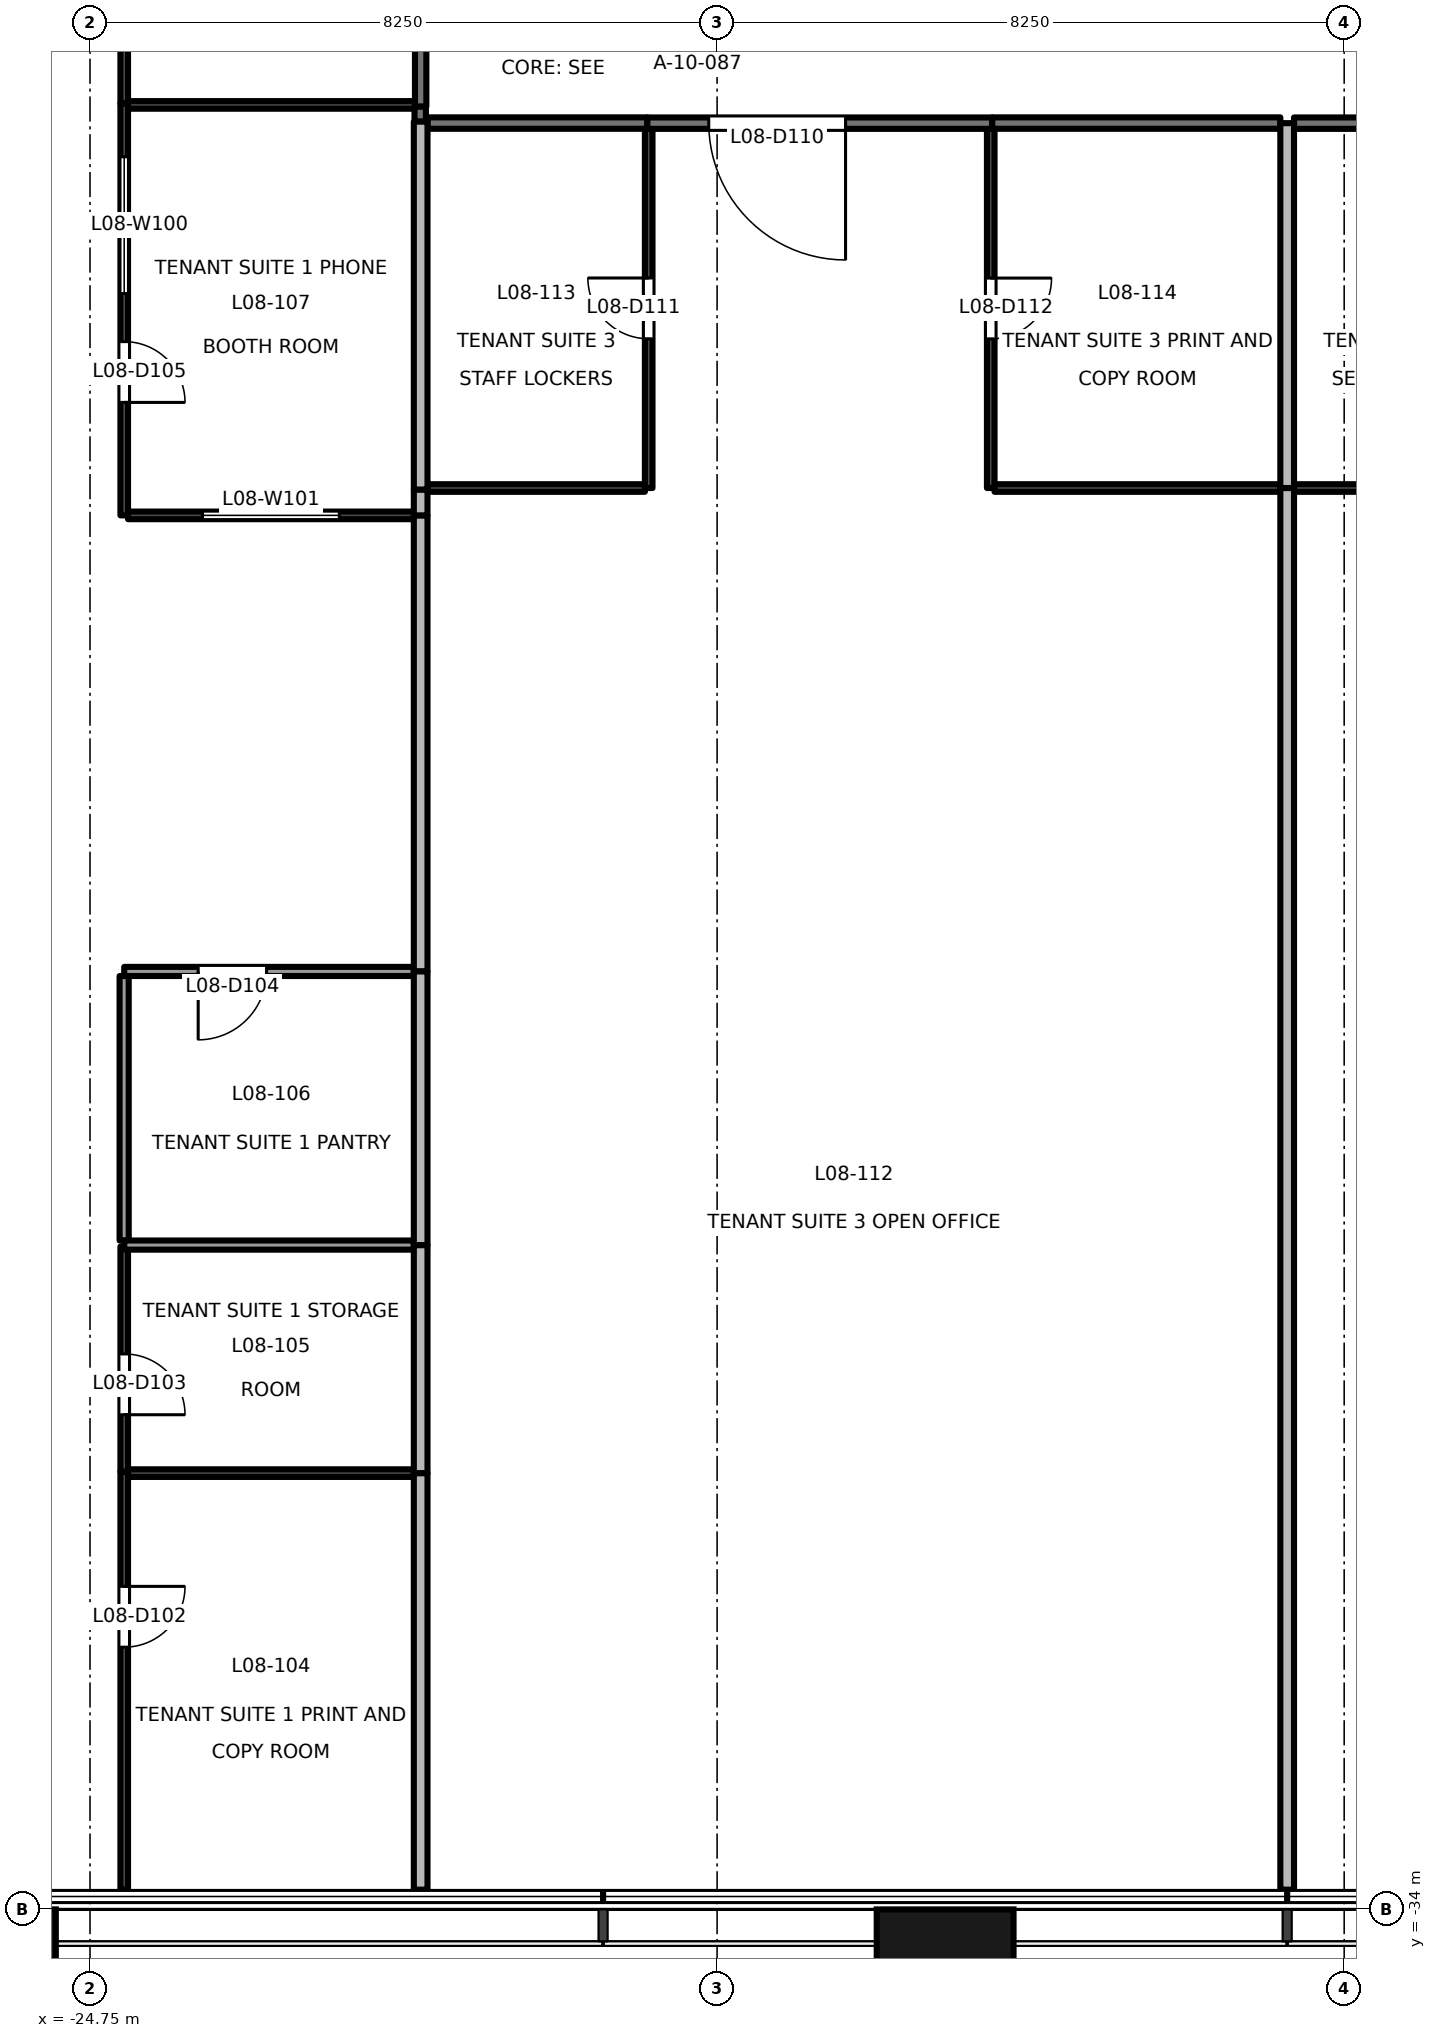
"""IFC4 building model, lengths in metres.
Left out: names, types, materials, properties, quantities, classifications, styles, units other than length and angle.
Written with IfcOpenShell. Run it as: python <this file> out.ifc"""

import sys

from ifc_helpers import new_model, si_unit, direction, frame, frame_2d, origin, origin_2d, place, context, subcontext, project, spatial, rectangle, extrude, element, fill, save


model = new_model("IFC4")
c1 = context("Model", 3, precision=1e-05, world=origin(), true_north=direction((0.0, 1.0)))
c2 = subcontext(c1, "Body", "Model", "MODEL_VIEW")
j1 = project(units=[si_unit("LENGTHUNIT", "METRE"), si_unit("PLANEANGLEUNIT", "RADIAN")], contexts=[c1])
p1 = place(None, origin())
s1 = spatial("IfcSite", under=j1, at=p1, CompositionType="ELEMENT")
p2 = place(p1, origin())
s2 = spatial("IfcBuilding", under=s1, at=p2, CompositionType="ELEMENT")
p3 = place(p2, frame((0.0, 0.0, 40.6)))
s3 = spatial("IfcBuildingStorey", under=s2, at=p3, CompositionType="ELEMENT", Elevation=40.6)
for number, where, z_axis, x_axis in (
    (1, (-26.1, -34.9, -0.2), (0.0, 0.0, 1.0), (1.0, 0.0, 0.0)),
    (2, (-13.5, -34.9, -0.2), (0.0, 0.0, 1.0), (1.0, 0.0, 0.0)),
):
    element("IfcColumn", number, at=place(p3, frame(where, z_axis=z_axis, x_axis=x_axis)), inside=s3, PredefinedType="COLUMN", context=c2, shape_type="SweptSolid", body=[
        extrude(rectangle(XDim=1.8, YDim=1.8, at=origin_2d()), origin(), (0.0, 0.0, 1.0), 4.1),
    ])
p4 = place(p3, frame((-20.406, -10.48, 0.0), z_axis=(0.0, 0.0, 1.0), x_axis=(0.0, 1.0, 0.0)))
e3 = element("IfcWall", 3, at=p4, inside=s3, PredefinedType="PARTITIONING", context=c2, shape_type="SweptSolid", body=[
    extrude(rectangle(XDim=0.2, YDim=0.15, at=frame_2d((0.1, 0.0))), origin(), (0.0, 0.0, 1.0), 3.9),
])
p5 = place(p3, frame((-20.4, -10.28, 0.0), z_axis=(0.0, 0.0, 1.0), x_axis=(0.0, 1.0, 0.0)))
e4 = element("IfcWall", 4, at=p5, inside=s3, PredefinedType="PARTITIONING", context=c2, shape_type="SweptSolid", body=[
    extrude(rectangle(XDim=4.2, YDim=0.15, at=frame_2d((2.1, 0.0))), origin(), (0.0, 0.0, 1.0), 3.3),
])
p6 = place(p3, frame((-12.88, -10.5, 0.0), z_axis=(0.0, 0.0, 1.0), x_axis=(-1.0, 0.0, 0.0)))
e5 = element("IfcWall", 5, at=p6, inside=s3, PredefinedType="PARTITIONING", context=c2, shape_type="SweptSolid", body=[
    extrude(rectangle(XDim=4.54, YDim=0.15, at=frame_2d((2.27, 0.0))), origin(), (0.0, 0.0, 1.0), 2.9),
])
p7 = place(p6, frame((1.93, 0.0, 0.0)))
e6 = element("IfcOpeningElement", 6, at=p7, cuts=e5, PredefinedType="OPENING", context=c2, shape_type="SweptSolid", body=[
    extrude(rectangle(XDim=1.8, YDim=2.1, at=frame_2d((0.9, 1.05))), frame((0.0, 0.085, 0.0), z_axis=(0.0, -1.0, 0.0), x_axis=(1.0, 0.0, 0.0)), (0.0, 0.0, 1.0), 0.171),
])
p8 = place(p3, frame((-17.42, -10.499, 0.0), z_axis=(0.0, 0.0, 1.0), x_axis=(-1.0, 0.0, 0.0)))
e7 = element("IfcWall", 7, at=p8, inside=s3, PredefinedType="PARTITIONING", context=c2, shape_type="SweptSolid", body=[
    extrude(rectangle(XDim=2.89, YDim=0.15, at=frame_2d((1.445, 0.0))), origin(), (0.0, 0.0, 1.0), 2.5),
])
p9 = place(p3, frame((-9.09, -10.499, 0.0), z_axis=(0.0, 0.0, 1.0), x_axis=(-1.0, 0.0, 0.0)))
e8 = element("IfcWall", 8, at=p9, inside=s3, PredefinedType="PARTITIONING", context=c2, shape_type="SweptSolid", body=[
    extrude(rectangle(XDim=3.79, YDim=0.15, at=frame_2d((1.895, 0.0))), origin(), (0.0, 0.0, 1.0), 2.9),
])
p10 = place(p3, frame((-6.02, -10.5, 0.0), z_axis=(0.0, 0.0, 1.0), x_axis=(-1.0, 0.0, 0.0)))
e9 = element("IfcWall", 9, at=p10, inside=s3, PredefinedType="PARTITIONING", context=c2, shape_type="SweptSolid", body=[
    extrude(rectangle(XDim=2.89, YDim=0.15, at=frame_2d((1.445, 0.0))), origin(), (0.0, 0.0, 1.0), 2.9),
])
p11 = place(p3, frame((-24.3, -28.24, 0.0), z_axis=(0.0, 0.0, 1.0), x_axis=(0.0, -1.0, 0.0)))
e10 = element("IfcWall", 10, at=p11, inside=s3, PredefinedType="PARTITIONING", context=c2, shape_type="SweptSolid", body=[
    extrude(rectangle(XDim=5.5, YDim=0.1, at=frame_2d((2.75, 0.0))), origin(), (0.0, 0.0, 1.0), 3.9),
])
p12 = place(p11, frame((1.51, 0.0, 0.0)))
e11 = element("IfcOpeningElement", 11, at=p12, cuts=e10, PredefinedType="OPENING", context=c2, shape_type="SweptSolid", body=[
    extrude(rectangle(XDim=0.8, YDim=2.1, at=frame_2d((0.4, 1.05))), frame((0.0, 0.061, 0.0), z_axis=(0.0, -1.0, 0.0), x_axis=(1.0, 0.0, 0.0)), (0.0, 0.0, 1.0), 0.121),
])
p13 = place(p3, frame((-24.3, -25.28, 0.0), z_axis=(0.0, 0.0, 1.0), x_axis=(0.0, -1.0, 0.0)))
e12 = element("IfcWall", 12, at=p13, inside=s3, PredefinedType="PARTITIONING", context=c2, shape_type="SweptSolid", body=[
    extrude(rectangle(XDim=2.96, YDim=0.1, at=frame_2d((1.48, 0.0))), origin(), (0.0, 0.0, 1.0), 3.3),
])
p14 = place(p13, frame((1.412, 0.0, 0.0)))
e13 = element("IfcOpeningElement", 13, at=p14, cuts=e12, PredefinedType="OPENING", context=c2, shape_type="SweptSolid", body=[
    extrude(rectangle(XDim=0.8, YDim=2.1, at=frame_2d((0.4, 1.05))), frame((0.0, 0.061, 0.0), z_axis=(0.0, -1.0, 0.0), x_axis=(1.0, 0.0, 0.0)), (0.0, 0.0, 1.0), 0.121),
])
p15 = place(p3, frame((-24.301, -21.72, 0.0), z_axis=(0.0, 0.0, 1.0), x_axis=(0.0, -1.0, 0.0)))
e14 = element("IfcWall", 14, at=p15, inside=s3, PredefinedType="PARTITIONING", context=c2, shape_type="SweptSolid", body=[
    extrude(rectangle(XDim=3.48, YDim=0.12, at=frame_2d((1.74, 0.0))), origin(), (0.0, 0.0, 1.0), 3.3),
])
p16 = place(p3, frame((-20.49, -21.66, 0.0), z_axis=(0.0, 0.0, 1.0), x_axis=(-1.0, 0.0, 0.0)))
e15 = element("IfcWall", 15, at=p16, inside=s3, PredefinedType="PARTITIONING", context=c2, shape_type="SweptSolid", body=[
    extrude(rectangle(XDim=3.81, YDim=0.12, at=frame_2d((1.905, 0.0))), origin(), (0.0, 0.0, 1.0), 3.9),
])
p17 = place(p16, frame((1.937, 0.0, 0.0)))
e16 = element("IfcOpeningElement", 16, at=p17, cuts=e15, PredefinedType="OPENING", context=c2, shape_type="SweptSolid", body=[
    extrude(rectangle(XDim=0.9, YDim=2.1, at=frame_2d((0.45, 1.05))), frame((0.0, 0.071, 0.0), z_axis=(0.0, -1.0, 0.0), x_axis=(1.0, 0.0, 0.0)), (0.0, 0.0, 1.0), 0.141),
])
p18 = place(p3, frame((-24.3, -10.24, 0.0), z_axis=(0.0, 0.0, 1.0), x_axis=(0.0, -1.0, 0.0)))
e17 = element("IfcWall", 17, at=p18, inside=s3, PredefinedType="PARTITIONING", context=c2, shape_type="SweptSolid", body=[
    extrude(rectangle(XDim=5.42, YDim=0.1, at=frame_2d((2.71, 0.0))), origin(), (0.0, 0.0, 1.0), 3.3),
])
p19 = place(p18, frame((3.134, 0.0, 0.0)))
e18 = element("IfcOpeningElement", 18, at=p19, cuts=e17, PredefinedType="OPENING", context=c2, shape_type="SweptSolid", body=[
    extrude(rectangle(XDim=0.8, YDim=2.1, at=frame_2d((0.4, 1.05))), frame((0.0, 0.061, 0.0), z_axis=(0.0, -1.0, 0.0), x_axis=(1.0, 0.0, 0.0)), (0.0, 0.0, 1.0), 0.121),
])
p20 = place(p18, frame((0.702, 0.0, 0.9)))
e19 = element("IfcOpeningElement", 19, at=p20, cuts=e17, PredefinedType="OPENING", context=c2, shape_type="SweptSolid", body=[
    extrude(rectangle(XDim=1.8, YDim=1.2, at=frame_2d((0.9, 0.6))), frame((0.0, 0.061, 0.0), z_axis=(0.0, -1.0, 0.0), x_axis=(1.0, 0.0, 0.0)), (0.0, 0.0, 1.0), 0.121),
])
p21 = place(p3, frame((-24.25, -15.66, 0.0), z_axis=(0.0, 0.0, 1.0), x_axis=(1.0, 0.0, 0.0)))
e20 = element("IfcWall", 20, at=p21, inside=s3, PredefinedType="PARTITIONING", context=c2, shape_type="SweptSolid", body=[
    extrude(rectangle(XDim=3.76, YDim=0.1, at=frame_2d((1.88, 0.0))), origin(), (0.0, 0.0, 1.0), 3.9),
])
p22 = place(p21, frame((0.98, 0.0, 0.9)))
e21 = element("IfcOpeningElement", 21, at=p22, cuts=e20, PredefinedType="OPENING", context=c2, shape_type="SweptSolid", body=[
    extrude(rectangle(XDim=1.8, YDim=1.2, at=frame_2d((0.9, 0.6))), frame((0.0, 0.061, 0.0), z_axis=(0.0, -1.0, 0.0), x_axis=(1.0, 0.0, 0.0)), (0.0, 0.0, 1.0), 0.121),
])
p23 = place(p3, frame((-24.3, -6.06, 0.0), z_axis=(0.0, 0.0, 1.0), x_axis=(0.0, -1.0, 0.0)))
e22 = element("IfcWall", 22, at=p23, inside=s3, PredefinedType="PARTITIONING", context=c2, shape_type="SweptSolid", body=[
    extrude(rectangle(XDim=4.18, YDim=0.1, at=frame_2d((2.09, 0.0))), origin(), (0.0, 0.0, 1.0), 3.3),
])
p24 = place(p23, frame((1.084, 0.0, 0.0)))
e23 = element("IfcOpeningElement", 23, at=p24, cuts=e22, PredefinedType="OPENING", context=c2, shape_type="SweptSolid", body=[
    extrude(rectangle(XDim=0.9, YDim=2.1, at=frame_2d((0.45, 1.05))), frame((0.0, 0.061, 0.0), z_axis=(0.0, -1.0, 0.0), x_axis=(1.0, 0.0, 0.0)), (0.0, 0.0, 1.0), 0.121),
])
p25 = place(p3, frame((-20.4, -15.66, 0.0), z_axis=(0.0, 0.0, 1.0), x_axis=(0.0, -1.0, 0.0)))
e24 = element("IfcWall", 24, at=p25, inside=s3, PredefinedType="PARTITIONING", context=c2, shape_type="SweptSolid", body=[
    extrude(rectangle(XDim=6.0, YDim=0.18, at=frame_2d((3.0, 0.0))), origin(), (0.0, 0.0, 1.0), 3.3),
])
p26 = place(p3, frame((-24.25, -28.26, 0.0), z_axis=(0.0, 0.0, 1.0), x_axis=(1.0, 0.0, 0.0)))
e25 = element("IfcWall", 25, at=p26, inside=s3, PredefinedType="PARTITIONING", context=c2, shape_type="SweptSolid", body=[
    extrude(rectangle(XDim=3.76, YDim=0.1, at=frame_2d((1.88, 0.0))), origin(), (0.0, 0.0, 1.0), 3.9),
])
p27 = place(p3, frame((-20.4, -28.26, 0.0), z_axis=(0.0, 0.0, 1.0), x_axis=(0.0, -1.0, 0.0)))
e26 = element("IfcWall", 26, at=p27, inside=s3, PredefinedType="PARTITIONING", context=c2, shape_type="SweptSolid", body=[
    extrude(rectangle(XDim=5.48, YDim=0.18, at=frame_2d((2.74, 0.0))), origin(), (0.0, 0.0, 1.0), 3.9),
])
p28 = place(p3, frame((-24.3, -25.26, 0.0), z_axis=(0.0, 0.0, 1.0), x_axis=(1.0, 0.0, 0.0)))
e27 = element("IfcWall", 27, at=p28, inside=s3, PredefinedType="PARTITIONING", context=c2, shape_type="SweptSolid", body=[
    extrude(rectangle(XDim=3.81, YDim=0.12, at=frame_2d((1.905, 0.0))), origin(), (0.0, 0.0, 1.0), 3.9),
])
p29 = place(p3, frame((-20.4, -25.26, 0.0), z_axis=(0.0, 0.0, 1.0), x_axis=(0.0, -1.0, 0.0)))
e28 = element("IfcWall", 28, at=p29, inside=s3, PredefinedType="PARTITIONING", context=c2, shape_type="SweptSolid", body=[
    extrude(rectangle(XDim=3.0, YDim=0.18, at=frame_2d((1.5, 0.0))), origin(), (0.0, 0.0, 1.0), 3.3),
])
p30 = place(p3, frame((-20.4, -21.66, 0.0), z_axis=(0.0, 0.0, 1.0), x_axis=(0.0, -1.0, 0.0)))
e29 = element("IfcWall", 29, at=p30, inside=s3, PredefinedType="PARTITIONING", context=c2, shape_type="SweptSolid", body=[
    extrude(rectangle(XDim=3.6, YDim=0.18, at=frame_2d((1.8, 0.0))), origin(), (0.0, 0.0, 1.0), 3.3),
])
p31 = place(p3, frame((-24.25, -10.26, 0.0), z_axis=(0.0, 0.0, 1.0), x_axis=(1.0, 0.0, 0.0)))
e30 = element("IfcWall", 30, at=p31, inside=s3, PredefinedType="PARTITIONING", context=c2, shape_type="SweptSolid", body=[
    extrude(rectangle(XDim=3.775, YDim=0.1, at=frame_2d((1.887, 0.0))), origin(), (0.0, 0.0, 1.0), 3.9),
])
p32 = place(p3, frame((-20.4, -15.32, 0.0), z_axis=(0.0, 0.0, 1.0), x_axis=(0.0, -1.0, 0.0)))
e31 = element("IfcWall", 31, at=p32, inside=s3, PredefinedType="PARTITIONING", context=c2, shape_type="SweptSolid", body=[
    extrude(rectangle(XDim=0.34, YDim=0.18, at=frame_2d((0.17, 0.0))), origin(), (0.0, 0.0, 1.0), 3.9),
])
p33 = place(p3, frame((-20.4, -10.48, 0.0), z_axis=(0.0, 0.0, 1.0), x_axis=(0.0, -1.0, 0.0)))
e32 = element("IfcWall", 32, at=p33, inside=s3, PredefinedType="PARTITIONING", context=c2, shape_type="SweptSolid", body=[
    extrude(rectangle(XDim=4.84, YDim=0.18, at=frame_2d((2.42, 0.0))), origin(), (0.0, 0.0, 1.0), 3.3),
])
p34 = place(p3, frame((-20.31, -15.3, 0.0), z_axis=(0.0, 0.0, 1.0), x_axis=(1.0, 0.0, 0.0)))
e33 = element("IfcWall", 33, at=p34, inside=s3, PredefinedType="PARTITIONING", context=c2, shape_type="SweptSolid", body=[
    extrude(rectangle(XDim=2.86, YDim=0.1, at=frame_2d((1.43, 0.0))), origin(), (0.0, 0.0, 1.0), 2.5),
])
p35 = place(p3, frame((-17.4, -15.3, 0.0), z_axis=(0.0, 0.0, 1.0), x_axis=(0.0, 1.0, 0.0)))
e34 = element("IfcWall", 34, at=p35, inside=s3, PredefinedType="PARTITIONING", context=c2, shape_type="SweptSolid", body=[
    extrude(rectangle(XDim=4.725, YDim=0.1, at=frame_2d((2.363, 0.0))), origin(), (0.0, 0.0, 1.0), 3.9),
])
p36 = place(p35, frame((1.963, 0.0, 0.0)))
e35 = element("IfcOpeningElement", 35, at=p36, cuts=e34, PredefinedType="OPENING", context=c2, shape_type="SweptSolid", body=[
    extrude(rectangle(XDim=0.8, YDim=2.1, at=frame_2d((0.4, 1.05))), frame((0.0, 0.061, 0.0), z_axis=(0.0, -1.0, 0.0), x_axis=(1.0, 0.0, 0.0)), (0.0, 0.0, 1.0), 0.121),
])
p37 = place(p3, frame((-12.9, -10.575, 0.0), z_axis=(0.0, 0.0, 1.0), x_axis=(0.0, -1.0, 0.0)))
e36 = element("IfcWall", 36, at=p37, inside=s3, PredefinedType="PARTITIONING", context=c2, shape_type="SweptSolid", body=[
    extrude(rectangle(XDim=4.725, YDim=0.1, at=frame_2d((2.363, 0.0))), origin(), (0.0, 0.0, 1.0), 3.9),
])
p38 = place(p37, frame((1.963, 0.0, 0.0)))
e37 = element("IfcOpeningElement", 37, at=p38, cuts=e36, PredefinedType="OPENING", context=c2, shape_type="SweptSolid", body=[
    extrude(rectangle(XDim=0.8, YDim=2.1, at=frame_2d((0.4, 1.05))), frame((0.0, 0.061, 0.0), z_axis=(0.0, -1.0, 0.0), x_axis=(1.0, 0.0, 0.0)), (0.0, 0.0, 1.0), 0.121),
])
p39 = place(p3, frame((-12.85, -15.3, 0.0), z_axis=(0.0, 0.0, 1.0), x_axis=(1.0, 0.0, 0.0)))
e38 = element("IfcWall", 38, at=p39, inside=s3, PredefinedType="PARTITIONING", context=c2, shape_type="SweptSolid", body=[
    extrude(rectangle(XDim=3.76, YDim=0.1, at=frame_2d((1.88, 0.0))), origin(), (0.0, 0.0, 1.0), 2.9),
])
p40 = place(p3, frame((-9.0, -15.3, 0.0), z_axis=(0.0, 0.0, 1.0), x_axis=(0.0, -1.0, 0.0)))
e39 = element("IfcWall", 39, at=p40, inside=s3, PredefinedType="PARTITIONING", context=c2, shape_type="SweptSolid", body=[
    extrude(rectangle(XDim=18.44, YDim=0.18, at=frame_2d((9.22, 0.0))), origin(), (0.0, 0.0, 1.0), 2.9),
])
p41 = place(p3, frame((-9.0, -10.5, 0.0), z_axis=(0.0, 0.0, 1.0), x_axis=(0.0, -1.0, 0.0)))
e40 = element("IfcWall", 40, at=p41, inside=s3, PredefinedType="PARTITIONING", context=c2, shape_type="SweptSolid", body=[
    extrude(rectangle(XDim=4.8, YDim=0.18, at=frame_2d((2.4, 0.0))), origin(), (0.0, 0.0, 1.0), 2.9),
])
p42 = place(p3, frame((-8.91, -15.3, 0.0), z_axis=(0.0, 0.0, 1.0), x_axis=(1.0, 0.0, 0.0)))
e41 = element("IfcWall", 41, at=p42, inside=s3, PredefinedType="PARTITIONING", context=c2, shape_type="SweptSolid", body=[
    extrude(rectangle(XDim=2.86, YDim=0.1, at=frame_2d((1.43, 0.0))), origin(), (0.0, 0.0, 1.0), 2.9),
])
p43 = place(p12, origin())
e42 = element("IfcDoor", 42, at=p43, inside=s3, OperationType="SINGLE_SWING_LEFT", PredefinedType="DOOR", context=c2, shape_type="SweptSolid", body=[
    extrude(rectangle(XDim=0.8, YDim=2.1, at=frame_2d((0.4, 1.05))), frame((0.0, 0.025, 0.0), z_axis=(0.0, -1.0, 0.0), x_axis=(1.0, 0.0, 0.0)), (0.0, 0.0, 1.0), 0.05),
])
fill(e11, e42)
p44 = place(p14, origin())
e43 = element("IfcDoor", 43, at=p44, inside=s3, OperationType="SINGLE_SWING_RIGHT", PredefinedType="DOOR", context=c2, shape_type="SweptSolid", body=[
    extrude(rectangle(XDim=0.8, YDim=2.1, at=frame_2d((0.4, 1.05))), frame((0.0, 0.025, 0.0), z_axis=(0.0, -1.0, 0.0), x_axis=(1.0, 0.0, 0.0)), (0.0, 0.0, 1.0), 0.05),
])
fill(e13, e43)
p45 = place(p17, origin())
e44 = element("IfcDoor", 44, at=p45, inside=s3, OperationType="SINGLE_SWING_RIGHT", PredefinedType="DOOR", context=c2, shape_type="SweptSolid", body=[
    extrude(rectangle(XDim=0.9, YDim=2.1, at=frame_2d((0.45, 1.05))), frame((0.0, 0.025, 0.0), z_axis=(0.0, -1.0, 0.0), x_axis=(1.0, 0.0, 0.0)), (0.0, 0.0, 1.0), 0.05),
])
fill(e16, e44)
p46 = place(p19, origin())
e45 = element("IfcDoor", 45, at=p46, inside=s3, OperationType="SINGLE_SWING_RIGHT", PredefinedType="DOOR", context=c2, shape_type="SweptSolid", body=[
    extrude(rectangle(XDim=0.8, YDim=2.1, at=frame_2d((0.4, 1.05))), frame((0.0, 0.025, 0.0), z_axis=(0.0, -1.0, 0.0), x_axis=(1.0, 0.0, 0.0)), (0.0, 0.0, 1.0), 0.05),
])
fill(e18, e45)
p47 = place(p7, origin())
e46 = element("IfcDoor", 46, at=p47, inside=s3, OperationType="DOUBLE_DOOR_SINGLE_SWING", PredefinedType="DOOR", context=c2, shape_type="SweptSolid", body=[
    extrude(rectangle(XDim=1.8, YDim=2.1, at=frame_2d((0.9, 1.05))), frame((0.0, 0.025, 0.0), z_axis=(0.0, -1.0, 0.0), x_axis=(1.0, 0.0, 0.0)), (0.0, 0.0, 1.0), 0.05),
])
fill(e6, e46)
p48 = place(p36, origin())
e47 = element("IfcDoor", 47, at=p48, inside=s3, OperationType="SINGLE_SWING_RIGHT", PredefinedType="DOOR", context=c2, shape_type="SweptSolid", body=[
    extrude(rectangle(XDim=0.8, YDim=2.1, at=frame_2d((0.4, 1.05))), frame((0.0, 0.025, 0.0), z_axis=(0.0, -1.0, 0.0), x_axis=(1.0, 0.0, 0.0)), (0.0, 0.0, 1.0), 0.05),
])
fill(e35, e47)
p49 = place(p38, origin())
e48 = element("IfcDoor", 48, at=p49, inside=s3, OperationType="SINGLE_SWING_LEFT", PredefinedType="DOOR", context=c2, shape_type="SweptSolid", body=[
    extrude(rectangle(XDim=0.8, YDim=2.1, at=frame_2d((0.4, 1.05))), frame((0.0, 0.025, 0.0), z_axis=(0.0, -1.0, 0.0), x_axis=(1.0, 0.0, 0.0)), (0.0, 0.0, 1.0), 0.05),
])
fill(e37, e48)
p50 = place(p20, origin())
e49 = element("IfcWindow", 49, at=p50, inside=s3, PartitioningType="SINGLE_PANEL", PredefinedType="WINDOW", context=c2, shape_type="SweptSolid", body=[
    extrude(rectangle(XDim=1.8, YDim=1.2, at=frame_2d((0.9, 0.6))), frame((0.0, 0.03, 0.0), z_axis=(0.0, -1.0, 0.0), x_axis=(1.0, 0.0, 0.0)), (0.0, 0.0, 1.0), 0.06),
])
fill(e19, e49)
p51 = place(p22, origin())
e50 = element("IfcWindow", 50, at=p51, inside=s3, PartitioningType="SINGLE_PANEL", PredefinedType="WINDOW", context=c2, shape_type="SweptSolid", body=[
    extrude(rectangle(XDim=1.8, YDim=1.2, at=frame_2d((0.9, 0.6))), frame((0.0, 0.03, 0.0), z_axis=(0.0, -1.0, 0.0), x_axis=(1.0, 0.0, 0.0)), (0.0, 0.0, 1.0), 0.06),
])
fill(e21, e50)
save(model, sys.argv[1])
